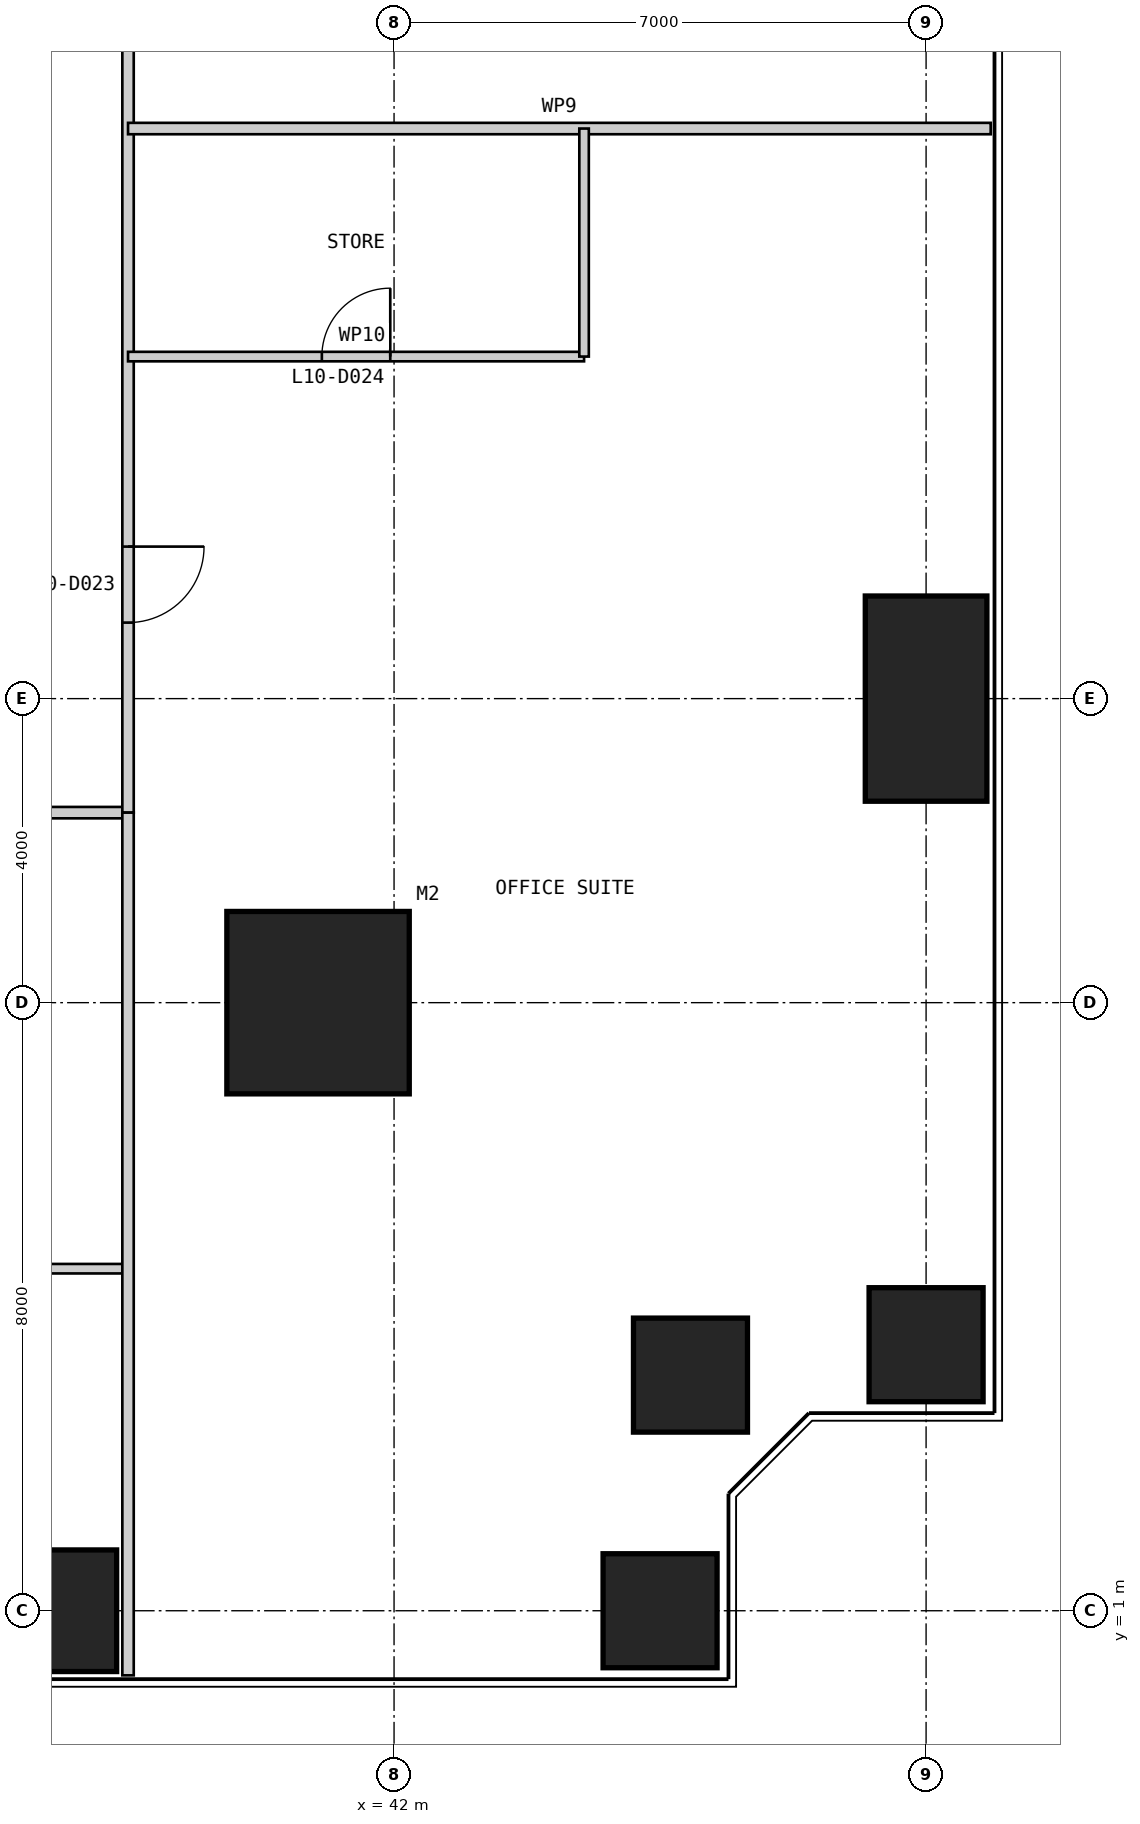
"""IFC4 building model, lengths in metres.
Left out: names, types, materials, properties, quantities, classifications, styles, units other than length and angle.
Written with IfcOpenShell. Run it as: python <this file> out.ifc"""

import sys

from ifc_helpers import new_model, si_unit, direction, frame, frame_2d, origin, origin_2d, place, context, subcontext, project, spatial, rectangle, extrude, element, fill, save


model = new_model("IFC4")
c1 = context("Model", 3, precision=1e-05, world=origin(), true_north=direction((0.0, 1.0)))
c2 = subcontext(c1, "Body", "Model", "MODEL_VIEW")
j1 = project(units=[si_unit("LENGTHUNIT", "METRE"), si_unit("PLANEANGLEUNIT", "RADIAN")], contexts=[c1])
p1 = place(None, origin())
s1 = spatial("IfcSite", under=j1, at=p1, CompositionType="ELEMENT")
p2 = place(p1, origin())
s2 = spatial("IfcBuilding", under=s1, at=p2, CompositionType="ELEMENT")
p3 = place(p2, frame((0.0, 0.0, 47.0)))
s3 = spatial("IfcBuildingStorey", under=s2, at=p3, CompositionType="ELEMENT", Elevation=47.0)
p4 = place(p3, frame((41.0, 9.0, 0.0), z_axis=(0.0, 0.0, 1.0), x_axis=(1.0, 0.0, 0.0)))
e1 = element("IfcColumn", 1, at=p4, inside=s3, PredefinedType="COLUMN", context=c2, shape_type="SweptSolid", body=[
    extrude(rectangle(XDim=2.4, YDim=2.4, at=origin_2d()), origin(), (0.0, 0.0, 1.0), 4.0),
])
p5 = place(p3, frame((37.0, 1.0, 0.0), z_axis=(0.0, 0.0, 1.0), x_axis=(1.0, 0.0, 0.0)))
e2 = element("IfcColumn", 2, at=p5, inside=s3, PredefinedType="COLUMN", context=c2, shape_type="SweptSolid", body=[
    extrude(rectangle(XDim=2.7, YDim=1.6, at=origin_2d()), origin(), (0.0, 0.0, 1.0), 4.0),
])
for number, where, z_axis, x_axis in (
    (3, (45.5, 1.0, 0.0), (0.0, 0.0, 1.0), (1.0, 0.0, 0.0)),
    (4, (45.9, 4.1, 0.0), (0.0, 0.0, 1.0), (1.0, 0.0, 0.0)),
    (5, (49.0, 4.5, 0.0), (0.0, 0.0, 1.0), (1.0, 0.0, 0.0)),
):
    element("IfcColumn", number, at=place(p3, frame(where, z_axis=z_axis, x_axis=x_axis)), inside=s3, PredefinedType="COLUMN", context=c2, shape_type="SweptSolid", body=[
        extrude(rectangle(XDim=1.5, YDim=1.5, at=origin_2d()), origin(), (0.0, 0.0, 1.0), 4.0),
    ])
p6 = place(p3, frame((49.0, 13.0, 0.0), z_axis=(0.0, 0.0, 1.0), x_axis=(1.0, 0.0, 0.0)))
e6 = element("IfcColumn", 6, at=p6, inside=s3, PredefinedType="COLUMN", context=c2, shape_type="SweptSolid", body=[
    extrude(rectangle(XDim=1.6, YDim=2.7, at=origin_2d()), origin(), (0.0, 0.0, 1.0), 4.0),
])
p7 = place(p3, frame((11.5, 11.5, 0.0), z_axis=(0.0, 0.0, 1.0), x_axis=(1.0, 0.0, 0.0)))
e7 = element("IfcWall", 7, at=p7, inside=s3, PredefinedType="PARTITIONING", context=c2, shape_type="SweptSolid", body=[
    extrude(rectangle(XDim=27.0, YDim=0.15, at=frame_2d((13.5, 0.0))), origin(), (0.0, 0.0, 1.0), 3.85),
])
p8 = place(p7, frame((2.5, 0.0, 0.0)))
e8 = element("IfcOpeningElement", 8, at=p8, cuts=e7, PredefinedType="OPENING", context=c2, shape_type="SweptSolid", body=[
    extrude(rectangle(XDim=1.0, YDim=2.2, at=frame_2d((0.5, 1.1))), frame((0.0, 0.085, 0.0), z_axis=(0.0, -1.0, 0.0), x_axis=(1.0, 0.0, 0.0)), (0.0, 0.0, 1.0), 0.17),
])
p9 = place(p7, frame((16.0, 0.0, 0.0)))
e9 = element("IfcOpeningElement", 9, at=p9, cuts=e7, PredefinedType="OPENING", context=c2, shape_type="SweptSolid", body=[
    extrude(rectangle(XDim=1.0, YDim=2.2, at=frame_2d((0.5, 1.1))), frame((0.0, 0.085, 0.0), z_axis=(0.0, -1.0, 0.0), x_axis=(1.0, 0.0, 0.0)), (0.0, 0.0, 1.0), 0.17),
])
p10 = place(p3, frame((32.5, 5.5, 0.0), z_axis=(0.0, 0.0, 1.0), x_axis=(1.0, 0.0, 0.0)))
e10 = element("IfcWall", 10, at=p10, inside=s3, PredefinedType="PARTITIONING", context=c2, shape_type="SweptSolid", body=[
    extrude(rectangle(XDim=6.0, YDim=0.125, at=frame_2d((3.0, 0.0))), origin(), (0.0, 0.0, 1.0), 3.85),
])
p11 = place(p3, frame((38.5, 11.5, 0.0), z_axis=(0.0, 0.0, 1.0), x_axis=(0.0, 1.0, 0.0)))
e11 = element("IfcWall", 11, at=p11, inside=s3, PredefinedType="PARTITIONING", context=c2, shape_type="SweptSolid", body=[
    extrude(rectangle(XDim=27.0, YDim=0.15, at=frame_2d((13.5, 0.0))), origin(), (0.0, 0.0, 1.0), 3.85),
])
p12 = place(p11, frame((2.5, 0.0, 0.0)))
e12 = element("IfcOpeningElement", 12, at=p12, cuts=e11, PredefinedType="OPENING", context=c2, shape_type="SweptSolid", body=[
    extrude(rectangle(XDim=1.0, YDim=2.2, at=frame_2d((0.5, 1.1))), frame((0.0, 0.085, 0.0), z_axis=(0.0, -1.0, 0.0), x_axis=(1.0, 0.0, 0.0)), (0.0, 0.0, 1.0), 0.17),
])
p13 = place(p11, frame((16.0, 0.0, 0.0)))
e13 = element("IfcOpeningElement", 13, at=p13, cuts=e11, PredefinedType="OPENING", context=c2, shape_type="SweptSolid", body=[
    extrude(rectangle(XDim=1.0, YDim=2.2, at=frame_2d((0.5, 1.1))), frame((0.0, 0.085, 0.0), z_axis=(0.0, -1.0, 0.0), x_axis=(1.0, 0.0, 0.0)), (0.0, 0.0, 1.0), 0.17),
])
p14 = place(p3, frame((38.5, 0.15, 0.0), z_axis=(0.0, 0.0, 1.0), x_axis=(0.0, 1.0, 0.0)))
e14 = element("IfcWall", 14, at=p14, inside=s3, PredefinedType="PARTITIONING", context=c2, shape_type="SweptSolid", body=[
    extrude(rectangle(XDim=11.35, YDim=0.15, at=frame_2d((5.675, 0.0))), origin(), (0.0, 0.0, 1.0), 3.85),
])
p15 = place(p3, frame((44.5, 17.5, 0.0), z_axis=(0.0, 0.0, 1.0), x_axis=(-1.0, 0.0, 0.0)))
e15 = element("IfcWall", 15, at=p15, inside=s3, PredefinedType="PARTITIONING", context=c2, shape_type="SweptSolid", body=[
    extrude(rectangle(XDim=6.0, YDim=0.125, at=frame_2d((3.0, 0.0))), origin(), (0.0, 0.0, 1.0), 3.85),
])
p16 = place(p15, frame((2.55, 0.0, 0.0)))
e16 = element("IfcOpeningElement", 16, at=p16, cuts=e15, PredefinedType="OPENING", context=c2, shape_type="SweptSolid", body=[
    extrude(rectangle(XDim=0.9, YDim=2.2, at=frame_2d((0.45, 1.1))), frame((0.0, 0.073, 0.0), z_axis=(0.0, -1.0, 0.0), x_axis=(1.0, 0.0, 0.0)), (0.0, 0.0, 1.0), 0.145),
])
p17 = place(p3, frame((49.85, 20.5, 0.0), z_axis=(0.0, 0.0, 1.0), x_axis=(-1.0, 0.0, 0.0)))
e17 = element("IfcWall", 17, at=p17, inside=s3, PredefinedType="PARTITIONING", context=c2, shape_type="SweptSolid", body=[
    extrude(rectangle(XDim=11.35, YDim=0.15, at=frame_2d((5.675, 0.0))), origin(), (0.0, 0.0, 1.0), 3.85),
])
p18 = place(p3, frame((44.5, 17.5, 0.0), z_axis=(0.0, 0.0, 1.0), x_axis=(0.0, 1.0, 0.0)))
e18 = element("IfcWall", 18, at=p18, inside=s3, PredefinedType="PARTITIONING", context=c2, shape_type="SweptSolid", body=[
    extrude(rectangle(XDim=3.0, YDim=0.125, at=frame_2d((1.5, 0.0))), origin(), (0.0, 0.0, 1.0), 3.85),
])
p19 = place(p12, frame((1.0, 0.0, 0.0), z_axis=(0.0, 0.0, 1.0), x_axis=(-1.0, 0.0, 0.0)))
e19 = element("IfcDoor", 19, at=p19, inside=s3, OperationType="SINGLE_SWING_LEFT", PredefinedType="DOOR", context=c2, shape_type="SweptSolid", body=[
    extrude(rectangle(XDim=1.0, YDim=2.2, at=frame_2d((0.5, 1.1))), frame((0.0, 0.025, 0.0), z_axis=(0.0, -1.0, 0.0), x_axis=(1.0, 0.0, 0.0)), (0.0, 0.0, 1.0), 0.05),
])
fill(e12, e19)
p20 = place(p16, frame((0.9, 0.0, 0.0), z_axis=(0.0, 0.0, 1.0), x_axis=(-1.0, 0.0, 0.0)))
e20 = element("IfcDoor", 20, at=p20, inside=s3, OperationType="SINGLE_SWING_RIGHT", PredefinedType="DOOR", context=c2, shape_type="SweptSolid", body=[
    extrude(rectangle(XDim=0.9, YDim=2.2, at=frame_2d((0.45, 1.1))), frame((0.0, 0.025, 0.0), z_axis=(0.0, -1.0, 0.0), x_axis=(1.0, 0.0, 0.0)), (0.0, 0.0, 1.0), 0.05),
])
fill(e16, e20)
save(model, sys.argv[1])
